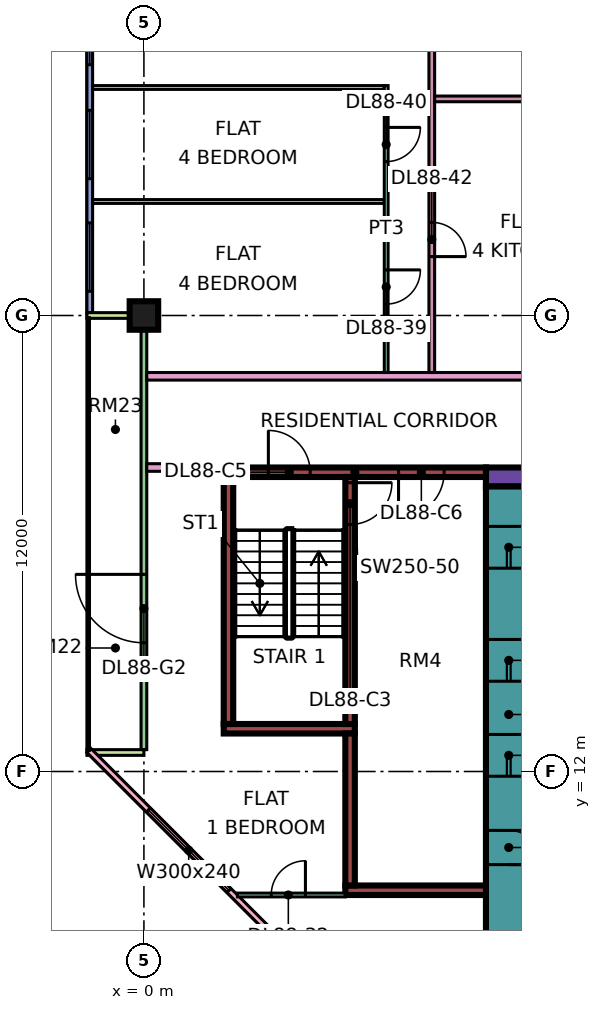
"""IFC4 building model, lengths in metres.
Left out: names, types, materials, properties, quantities, classifications, styles, units other than length and angle.
Written with IfcOpenShell. Run it as: python <this file> out.ifc"""

import sys

from ifc_helpers import new_model, si_unit, direction, frame, frame_2d, origin, origin_2d, place, context, subcontext, project, spatial, rectangle, extrude, element, fill, save


model = new_model("IFC4")
c1 = context("Model", 3, precision=1e-05, world=origin(), true_north=direction((0.0, 1.0)))
c2 = subcontext(c1, "Body", "Model", "MODEL_VIEW")
j1 = project(units=[si_unit("LENGTHUNIT", "METRE"), si_unit("PLANEANGLEUNIT", "RADIAN")], contexts=[c1])
p1 = place(None, origin())
s1 = spatial("IfcSite", under=j1, at=p1, CompositionType="ELEMENT")
p2 = place(p1, origin())
s2 = spatial("IfcBuilding", under=s1, at=p2, CompositionType="ELEMENT")
p3 = place(p2, frame((0.0, 0.0, 376.4)))
s3 = spatial("IfcBuildingStorey", under=s2, at=p3, CompositionType="ELEMENT", Elevation=376.4)
p4 = place(p3, frame((0.0, 24.0, 0.0), z_axis=(0.0, 0.0, 1.0), x_axis=(1.0, 0.0, 0.0)))
e1 = element("IfcColumn", 1, at=p4, inside=s3, PredefinedType="COLUMN", context=c2, shape_type="SweptSolid", body=[
    extrude(rectangle(XDim=0.75, YDim=0.75, at=origin_2d()), origin(), (0.0, 0.0, 1.0), 3.75),
])
p5 = place(p3, frame((9.0, 19.75, 0.0), z_axis=(0.0, 0.0, 1.0), x_axis=(1.0, 0.0, 0.0)))
e2 = element("IfcWall", 2, at=p5, inside=s3, PredefinedType="SHEAR", context=c2, shape_type="SweptSolid", body=[
    extrude(rectangle(XDim=25.0, YDim=0.5, at=frame_2d((12.5, 0.0))), origin(), (0.0, 0.0, 1.0), 3.75),
])
p6 = place(p5, frame((19.1, 0.0, 0.0)))
e3 = element("IfcOpeningElement", 3, at=p6, cuts=e2, PredefinedType="OPENING", context=c2, shape_type="SweptSolid", body=[
    extrude(rectangle(XDim=1.8, YDim=2.4, at=frame_2d((0.9, 1.2))), frame((0.0, 0.26, 0.0), z_axis=(0.0, -1.0, 0.0), x_axis=(1.0, 0.0, 0.0)), (0.0, 0.0, 1.0), 0.52),
])
p7 = place(p3, frame((9.6, 7.5, 0.0), z_axis=(0.0, 0.0, 1.0), x_axis=(0.0, 1.0, 0.0)))
e4 = element("IfcWall", 4, at=p7, inside=s3, PredefinedType="SHEAR", context=c2, shape_type="SweptSolid", body=[
    extrude(rectangle(XDim=12.0, YDim=1.2, at=frame_2d((6.0, 0.0))), origin(), (0.0, 0.0, 1.0), 3.75),
])
p8 = place(p7, frame((4.375, 0.0, 0.0)))
e5 = element("IfcOpeningElement", 5, at=p8, cuts=e4, PredefinedType="OPENING", context=c2, shape_type="SweptSolid", body=[
    extrude(rectangle(XDim=1.1, YDim=2.2, at=frame_2d((0.55, 1.1))), frame((0.0, 0.61, 0.0), z_axis=(0.0, -1.0, 0.0), x_axis=(1.0, 0.0, 0.0)), (0.0, 0.0, 1.0), 1.22),
])
p9 = place(p7, frame((6.875, 0.0, 0.0)))
e6 = element("IfcOpeningElement", 6, at=p9, cuts=e4, PredefinedType="OPENING", context=c2, shape_type="SweptSolid", body=[
    extrude(rectangle(XDim=1.1, YDim=2.2, at=frame_2d((0.55, 1.1))), frame((0.0, 0.61, 0.0), z_axis=(0.0, -1.0, 0.0), x_axis=(1.0, 0.0, 0.0)), (0.0, 0.0, 1.0), 1.22),
])
p10 = place(p7, frame((9.85, 0.0, 0.0)))
e7 = element("IfcOpeningElement", 7, at=p10, cuts=e4, PredefinedType="OPENING", context=c2, shape_type="SweptSolid", body=[
    extrude(rectangle(XDim=1.1, YDim=2.2, at=frame_2d((0.55, 1.1))), frame((0.0, 0.61, 0.0), z_axis=(0.0, -1.0, 0.0), x_axis=(1.0, 0.0, 0.0)), (0.0, 0.0, 1.0), 1.22),
])
p11 = place(p7, frame((2.05, 0.0, 0.0)))
e8 = element("IfcOpeningElement", 8, at=p11, cuts=e4, PredefinedType="OPENING", context=c2, shape_type="SweptSolid", body=[
    extrude(rectangle(XDim=0.9, YDim=2.1, at=frame_2d((0.45, 1.05))), frame((0.0, 0.61, 0.0), z_axis=(0.0, -1.0, 0.0), x_axis=(1.0, 0.0, 0.0)), (0.0, 0.0, 1.0), 1.22),
])
p12 = place(p3, frame((2.1, 19.875, 0.0), z_axis=(0.0, 0.0, 1.0), x_axis=(1.0, 0.0, 0.0)))
e9 = element("IfcWall", 9, at=p12, inside=s3, PredefinedType="SHEAR", context=c2, shape_type="SweptSolid", body=[
    extrude(rectangle(XDim=6.9, YDim=0.25, at=frame_2d((3.45, 0.0))), origin(), (0.0, 0.0, 1.0), 3.75),
])
p13 = place(p12, frame((1.175, 0.0, 0.0)))
e10 = element("IfcOpeningElement", 10, at=p13, cuts=e9, PredefinedType="OPENING", context=c2, shape_type="SweptSolid", body=[
    extrude(rectangle(XDim=1.1, YDim=2.2, at=frame_2d((0.55, 1.1))), frame((0.0, 0.135, 0.0), z_axis=(0.0, -1.0, 0.0), x_axis=(1.0, 0.0, 0.0)), (0.0, 0.0, 1.0), 0.27),
])
p14 = place(p12, frame((4.6, 0.0, 0.0)))
e11 = element("IfcOpeningElement", 11, at=p14, cuts=e9, PredefinedType="OPENING", context=c2, shape_type="SweptSolid", body=[
    extrude(rectangle(XDim=1.2, YDim=2.2, at=frame_2d((0.6, 1.1))), frame((0.0, 0.135, 0.0), z_axis=(0.0, -1.0, 0.0), x_axis=(1.0, 0.0, 0.0)), (0.0, 0.0, 1.0), 0.27),
])
p15 = place(p3, frame((2.1, 13.125, 0.0), z_axis=(0.0, 0.0, 1.0), x_axis=(1.0, 0.0, 0.0)))
e12 = element("IfcWall", 12, at=p15, inside=s3, PredefinedType="SHEAR", context=c2, shape_type="SweptSolid", body=[
    extrude(rectangle(XDim=3.45, YDim=0.25, at=frame_2d((1.725, 0.0))), origin(), (0.0, 0.0, 1.0), 3.75),
])
p16 = place(p3, frame((2.225, 13.25, 0.0), z_axis=(0.0, 0.0, 1.0), x_axis=(0.0, 1.0, 0.0)))
e13 = element("IfcWall", 13, at=p16, inside=s3, PredefinedType="SHEAR", context=c2, shape_type="SweptSolid", body=[
    extrude(rectangle(XDim=6.5, YDim=0.25, at=frame_2d((3.25, 0.0))), origin(), (0.0, 0.0, 1.0), 3.75),
])
p17 = place(p3, frame((5.425, 13.25, 0.0), z_axis=(0.0, 0.0, 1.0), x_axis=(0.0, 1.0, 0.0)))
e14 = element("IfcWall", 14, at=p17, inside=s3, PredefinedType="SHEAR", context=c2, shape_type="SweptSolid", body=[
    extrude(rectangle(XDim=6.5, YDim=0.25, at=frame_2d((3.25, 0.0))), origin(), (0.0, 0.0, 1.0), 3.75),
])
p18 = place(p17, frame((5.25, 0.0, 0.0)))
e15 = element("IfcOpeningElement", 15, at=p18, cuts=e14, PredefinedType="OPENING", context=c2, shape_type="SweptSolid", body=[
    extrude(rectangle(XDim=1.1, YDim=2.2, at=frame_2d((0.55, 1.1))), frame((0.0, 0.135, 0.0), z_axis=(0.0, -1.0, 0.0), x_axis=(1.0, 0.0, 0.0)), (0.0, 0.0, 1.0), 0.27),
])
p19 = place(p3, frame((5.3, 8.875, 0.0), z_axis=(0.0, 0.0, 1.0), x_axis=(1.0, 0.0, 0.0)))
e16 = element("IfcWall", 16, at=p19, inside=s3, PredefinedType="SHEAR", context=c2, shape_type="SweptSolid", body=[
    extrude(rectangle(XDim=3.7, YDim=0.25, at=frame_2d((1.85, 0.0))), origin(), (0.0, 0.0, 1.0), 3.75),
])
p20 = place(p3, frame((5.425, 9.0, 0.0), z_axis=(0.0, 0.0, 1.0), x_axis=(0.0, 1.0, 0.0)))
e17 = element("IfcWall", 17, at=p20, inside=s3, PredefinedType="SHEAR", context=c2, shape_type="SweptSolid", body=[
    extrude(rectangle(XDim=4.0, YDim=0.25, at=frame_2d((2.0, 0.0))), origin(), (0.0, 0.0, 1.0), 3.75),
])
p21 = place(p3, frame((-1.425, 35.925, 0.0), z_axis=(0.0, 0.0, 1.0), x_axis=(0.0, -1.0, 0.0)))
e18 = element("IfcWall", 18, at=p21, inside=s3, PredefinedType="SOLIDWALL", context=c2, shape_type="SweptSolid", body=[
    extrude(rectangle(XDim=11.85, YDim=0.15, at=frame_2d((5.925, 0.0))), origin(), (0.0, 0.0, 1.0), 3.35),
])
p22 = place(p21, frame((0.562, 0.0, 0.45)))
e19 = element("IfcOpeningElement", 19, at=p22, cuts=e18, PredefinedType="OPENING", context=c2, shape_type="SweptSolid", body=[
    extrude(rectangle(XDim=1.8, YDim=2.4, at=frame_2d((0.9, 1.2))), frame((0.0, 0.085, 0.0), z_axis=(0.0, -1.0, 0.0), x_axis=(1.0, 0.0, 0.0)), (0.0, 0.0, 1.0), 0.17),
])
p23 = place(p21, frame((3.525, 0.0, 0.45)))
e20 = element("IfcOpeningElement", 20, at=p23, cuts=e18, PredefinedType="OPENING", context=c2, shape_type="SweptSolid", body=[
    extrude(rectangle(XDim=1.8, YDim=2.4, at=frame_2d((0.9, 1.2))), frame((0.0, 0.085, 0.0), z_axis=(0.0, -1.0, 0.0), x_axis=(1.0, 0.0, 0.0)), (0.0, 0.0, 1.0), 0.17),
])
p24 = place(p21, frame((6.525, 0.0, 0.45)))
e21 = element("IfcOpeningElement", 21, at=p24, cuts=e18, PredefinedType="OPENING", context=c2, shape_type="SweptSolid", body=[
    extrude(rectangle(XDim=1.8, YDim=2.4, at=frame_2d((0.9, 1.2))), frame((0.0, 0.085, 0.0), z_axis=(0.0, -1.0, 0.0), x_axis=(1.0, 0.0, 0.0)), (0.0, 0.0, 1.0), 0.17),
])
p25 = place(p21, frame((9.488, 0.0, 0.45)))
e22 = element("IfcOpeningElement", 22, at=p25, cuts=e18, PredefinedType="OPENING", context=c2, shape_type="SweptSolid", body=[
    extrude(rectangle(XDim=1.8, YDim=2.4, at=frame_2d((0.9, 1.2))), frame((0.0, 0.085, 0.0), z_axis=(0.0, -1.0, 0.0), x_axis=(1.0, 0.0, 0.0)), (0.0, 0.0, 1.0), 0.17),
])
p26 = place(p3, frame((0.0, 23.925, 0.0), z_axis=(0.0, 0.0, 1.0), x_axis=(0.0, -1.0, 0.0)))
e23 = element("IfcWall", 23, at=p26, inside=s3, PredefinedType="SOLIDWALL", context=c2, shape_type="SweptSolid", body=[
    extrude(rectangle(XDim=11.35, YDim=0.15, at=frame_2d((5.675, 0.0))), origin(), (0.0, 0.0, 1.0), 3.35),
])
p27 = place(p26, frame((6.738, 0.0, 0.0)))
e24 = element("IfcOpeningElement", 24, at=p27, cuts=e23, PredefinedType="OPENING", context=c2, shape_type="SweptSolid", body=[
    extrude(rectangle(XDim=1.8, YDim=2.4, at=frame_2d((0.9, 1.2))), frame((0.0, 0.085, 0.0), z_axis=(0.0, -1.0, 0.0), x_axis=(1.0, 0.0, 0.0)), (0.0, 0.0, 1.0), 0.17),
])
for number, where, z_axis, x_axis in (
    (25, (-1.5, 24.0, 0.0), (0.0, 0.0, 1.0), (1.0, 0.0, 0.0)),
    (26, (-1.5, 12.5, 0.0), (0.0, 0.0, 1.0), (1.0, 0.0, 0.0)),
):
    element("IfcWall", number, at=place(p3, frame(where, z_axis=z_axis, x_axis=x_axis)), inside=s3, PredefinedType="SOLIDWALL", context=c2, shape_type="SweptSolid", body=[
        extrude(rectangle(XDim=1.5, YDim=0.15, at=frame_2d((0.75, 0.0))), origin(), (0.0, 0.0, 1.0), 3.35),
    ])
p28 = place(p3, frame((-1.447, 12.553, 0.0), z_axis=(0.0, 0.0, 1.0), x_axis=(0.707106781187, -0.707106781187, 0.0)))
e27 = element("IfcWall", 27, at=p28, inside=s3, PredefinedType="SOLIDWALL", context=c2, shape_type="SweptSolid", body=[
    extrude(rectangle(XDim=19.799, YDim=0.15, at=frame_2d((9.899, 0.0))), origin(), (0.0, 0.0, 1.0), 3.35),
])
p29 = place(p28, frame((2.212, 0.0, 0.45)))
e28 = element("IfcOpeningElement", 28, at=p29, cuts=e27, PredefinedType="OPENING", context=c2, shape_type="SweptSolid", body=[
    extrude(rectangle(XDim=3.0, YDim=2.4, at=frame_2d((1.5, 1.2))), frame((0.0, 0.085, 0.0), z_axis=(0.0, -1.0, 0.0), x_axis=(1.0, 0.0, 0.0)), (0.0, 0.0, 1.0), 0.17),
])
p30 = place(p28, frame((10.216, 0.0, 0.45)))
e29 = element("IfcOpeningElement", 29, at=p30, cuts=e27, PredefinedType="OPENING", context=c2, shape_type="SweptSolid", body=[
    extrude(rectangle(XDim=3.0, YDim=2.4, at=frame_2d((1.5, 1.2))), frame((0.0, 0.085, 0.0), z_axis=(0.0, -1.0, 0.0), x_axis=(1.0, 0.0, 0.0)), (0.0, 0.0, 1.0), 0.17),
])
p31 = place(p3, frame((-1.351, 27.0, 0.0), z_axis=(0.0, 0.0, 1.0), x_axis=(1.0, 0.0, 0.0)))
e30 = element("IfcWall", 30, at=p31, inside=s3, PredefinedType="PARTITIONING", context=c2, shape_type="SweptSolid", body=[
    extrude(rectangle(XDim=7.676, YDim=0.1, at=frame_2d((3.838, 0.0))), origin(), (0.0, 0.0, 1.0), 3.35),
])
p32 = place(p3, frame((-1.35, 30.0, 0.0), z_axis=(0.0, 0.0, 1.0), x_axis=(1.0, 0.0, 0.0)))
e31 = element("IfcWall", 31, at=p32, inside=s3, PredefinedType="PARTITIONING", context=c2, shape_type="SweptSolid", body=[
    extrude(rectangle(XDim=7.675, YDim=0.1, at=frame_2d((3.837, 0.0))), origin(), (0.0, 0.0, 1.0), 3.35),
])
p33 = place(p3, frame((0.074, 20.0, 0.0), z_axis=(0.0, 0.0, 1.0), x_axis=(1.0, 0.0, 0.0)))
e32 = element("IfcWall", 32, at=p33, inside=s3, PredefinedType="PARTITIONING", context=c2, shape_type="SweptSolid", body=[
    extrude(rectangle(XDim=2.026, YDim=0.2, at=frame_2d((1.013, 0.0))), origin(), (0.0, 0.0, 1.0), 3.35),
])
p34 = place(p3, frame((0.074, 22.4, 0.0), z_axis=(0.0, 0.0, 1.0), x_axis=(1.0, 0.0, 0.0)))
e33 = element("IfcWall", 33, at=p34, inside=s3, PredefinedType="PARTITIONING", context=c2, shape_type="SweptSolid", body=[
    extrude(rectangle(XDim=12.201, YDim=0.2, at=frame_2d((6.101, 0.0))), origin(), (0.0, 0.0, 1.0), 3.35),
])
p35 = place(p3, frame((2.461, 8.75, 0.0), z_axis=(0.0, 0.0, 1.0), x_axis=(1.0, 0.0, 0.0)))
e34 = element("IfcWall", 34, at=p35, inside=s3, PredefinedType="PARTITIONING", context=c2, shape_type="SweptSolid", body=[
    extrude(rectangle(XDim=2.839, YDim=0.1, at=frame_2d((1.419, 0.0))), origin(), (0.0, 0.0, 1.0), 3.35),
])
p36 = place(p35, frame((0.889, 0.0, 0.0)))
e35 = element("IfcOpeningElement", 35, at=p36, cuts=e34, PredefinedType="OPENING", context=c2, shape_type="SweptSolid", body=[
    extrude(rectangle(XDim=0.9, YDim=2.1, at=frame_2d((0.45, 1.05))), frame((0.0, 0.06, 0.0), z_axis=(0.0, -1.0, 0.0), x_axis=(1.0, 0.0, 0.0)), (0.0, 0.0, 1.0), 0.12),
])
p37 = place(p3, frame((6.375, 22.5, 0.0), z_axis=(0.0, 0.0, 1.0), x_axis=(0.0, 1.0, 0.0)))
e36 = element("IfcWall", 36, at=p37, inside=s3, PredefinedType="PARTITIONING", context=c2, shape_type="SweptSolid", body=[
    extrude(rectangle(XDim=7.55, YDim=0.1, at=frame_2d((3.775, 0.0))), origin(), (0.0, 0.0, 1.0), 3.35),
])
p38 = place(p37, frame((1.8, 0.0, 0.0)))
e37 = element("IfcOpeningElement", 37, at=p38, cuts=e36, PredefinedType="OPENING", context=c2, shape_type="SweptSolid", body=[
    extrude(rectangle(XDim=0.9, YDim=2.1, at=frame_2d((0.45, 1.05))), frame((0.0, 0.06, 0.0), z_axis=(0.0, -1.0, 0.0), x_axis=(1.0, 0.0, 0.0)), (0.0, 0.0, 1.0), 0.12),
])
p39 = place(p37, frame((5.55, 0.0, 0.0)))
e38 = element("IfcOpeningElement", 38, at=p39, cuts=e36, PredefinedType="OPENING", context=c2, shape_type="SweptSolid", body=[
    extrude(rectangle(XDim=0.9, YDim=2.1, at=frame_2d((0.45, 1.05))), frame((0.0, 0.06, 0.0), z_axis=(0.0, -1.0, 0.0), x_axis=(1.0, 0.0, 0.0)), (0.0, 0.0, 1.0), 0.12),
])
p40 = place(p3, frame((7.575, 22.5, 0.0), z_axis=(0.0, 0.0, 1.0), x_axis=(0.0, 1.0, 0.0)))
e39 = element("IfcWall", 39, at=p40, inside=s3, PredefinedType="PARTITIONING", context=c2, shape_type="SweptSolid", body=[
    extrude(rectangle(XDim=10.875, YDim=0.15, at=frame_2d((5.438, 0.0))), origin(), (0.0, 0.0, 1.0), 3.35),
])
p41 = place(p40, frame((8.55, 0.0, 0.0)))
e40 = element("IfcOpeningElement", 40, at=p41, cuts=e39, PredefinedType="OPENING", context=c2, shape_type="SweptSolid", body=[
    extrude(rectangle(XDim=0.8, YDim=2.1, at=frame_2d((0.4, 1.05))), frame((0.0, 0.085, 0.0), z_axis=(0.0, -1.0, 0.0), x_axis=(1.0, 0.0, 0.0)), (0.0, 0.0, 1.0), 0.17),
])
p42 = place(p40, frame((3.05, 0.0, 0.0)))
e41 = element("IfcOpeningElement", 41, at=p42, cuts=e39, PredefinedType="OPENING", context=c2, shape_type="SweptSolid", body=[
    extrude(rectangle(XDim=0.9, YDim=2.1, at=frame_2d((0.45, 1.05))), frame((0.0, 0.085, 0.0), z_axis=(0.0, -1.0, 0.0), x_axis=(1.0, 0.0, 0.0)), (0.0, 0.0, 1.0), 0.17),
])
p43 = place(p3, frame((7.65, 29.7, 0.0), z_axis=(0.0, 0.0, 1.0), x_axis=(1.0, 0.0, 0.0)))
e42 = element("IfcWall", 42, at=p43, inside=s3, PredefinedType="PARTITIONING", context=c2, shape_type="SweptSolid", body=[
    extrude(rectangle(XDim=4.625, YDim=0.15, at=frame_2d((2.312, 0.0))), origin(), (0.0, 0.0, 1.0), 3.35),
])
p44 = place(p23, origin())
e43 = element("IfcWindow", 43, at=p44, inside=s3, PartitioningType="SINGLE_PANEL", PredefinedType="WINDOW", context=c2, shape_type="SweptSolid", body=[
    extrude(rectangle(XDim=1.8, YDim=2.4, at=frame_2d((0.9, 1.2))), frame((0.0, 0.03, 0.0), z_axis=(0.0, -1.0, 0.0), x_axis=(1.0, 0.0, 0.0)), (0.0, 0.0, 1.0), 0.06),
])
fill(e20, e43)
p45 = place(p24, origin())
e44 = element("IfcWindow", 44, at=p45, inside=s3, PartitioningType="SINGLE_PANEL", PredefinedType="WINDOW", context=c2, shape_type="SweptSolid", body=[
    extrude(rectangle(XDim=1.8, YDim=2.4, at=frame_2d((0.9, 1.2))), frame((0.0, 0.03, 0.0), z_axis=(0.0, -1.0, 0.0), x_axis=(1.0, 0.0, 0.0)), (0.0, 0.0, 1.0), 0.06),
])
fill(e21, e44)
p46 = place(p25, origin())
e45 = element("IfcWindow", 45, at=p46, inside=s3, PartitioningType="SINGLE_PANEL", PredefinedType="WINDOW", context=c2, shape_type="SweptSolid", body=[
    extrude(rectangle(XDim=1.8, YDim=2.4, at=frame_2d((0.9, 1.2))), frame((0.0, 0.03, 0.0), z_axis=(0.0, -1.0, 0.0), x_axis=(1.0, 0.0, 0.0)), (0.0, 0.0, 1.0), 0.06),
])
fill(e22, e45)
p47 = place(p27, frame((1.8, 0.0, 0.0), z_axis=(0.0, 0.0, 1.0), x_axis=(-1.0, 0.0, 0.0)))
e46 = element("IfcDoor", 46, at=p47, inside=s3, OperationType="DOUBLE_DOOR_SINGLE_SWING", PredefinedType="DOOR", context=c2, shape_type="SweptSolid", body=[
    extrude(rectangle(XDim=1.8, YDim=2.4, at=frame_2d((0.9, 1.2))), frame((0.0, 0.025, 0.0), z_axis=(0.0, -1.0, 0.0), x_axis=(1.0, 0.0, 0.0)), (0.0, 0.0, 1.0), 0.05),
])
fill(e24, e46)
p48 = place(p29, origin())
e47 = element("IfcWindow", 47, at=p48, inside=s3, PartitioningType="SINGLE_PANEL", PredefinedType="WINDOW", context=c2, shape_type="SweptSolid", body=[
    extrude(rectangle(XDim=3.0, YDim=2.4, at=frame_2d((1.5, 1.2))), frame((0.0, 0.03, 0.0), z_axis=(0.0, -1.0, 0.0), x_axis=(1.0, 0.0, 0.0)), (0.0, 0.0, 1.0), 0.06),
])
fill(e28, e47)
p49 = place(p8, origin())
e48 = element("IfcDoor", 48, at=p49, inside=s3, OperationType="DOUBLE_DOOR_SLIDING", PredefinedType="DOOR", context=c2, shape_type="SweptSolid", body=[
    extrude(rectangle(XDim=1.1, YDim=2.2, at=frame_2d((0.55, 1.1))), frame((0.0, 0.025, 0.0), z_axis=(0.0, -1.0, 0.0), x_axis=(1.0, 0.0, 0.0)), (0.0, 0.0, 1.0), 0.05),
])
fill(e5, e48)
p50 = place(p9, origin())
e49 = element("IfcDoor", 49, at=p50, inside=s3, OperationType="DOUBLE_DOOR_SLIDING", PredefinedType="DOOR", context=c2, shape_type="SweptSolid", body=[
    extrude(rectangle(XDim=1.1, YDim=2.2, at=frame_2d((0.55, 1.1))), frame((0.0, 0.025, 0.0), z_axis=(0.0, -1.0, 0.0), x_axis=(1.0, 0.0, 0.0)), (0.0, 0.0, 1.0), 0.05),
])
fill(e6, e49)
p51 = place(p10, origin())
e50 = element("IfcDoor", 50, at=p51, inside=s3, OperationType="DOUBLE_DOOR_SLIDING", PredefinedType="DOOR", context=c2, shape_type="SweptSolid", body=[
    extrude(rectangle(XDim=1.1, YDim=2.2, at=frame_2d((0.55, 1.1))), frame((0.0, 0.025, 0.0), z_axis=(0.0, -1.0, 0.0), x_axis=(1.0, 0.0, 0.0)), (0.0, 0.0, 1.0), 0.05),
])
fill(e7, e50)
p52 = place(p18, origin())
e51 = element("IfcDoor", 51, at=p52, inside=s3, OperationType="SINGLE_SWING_RIGHT", PredefinedType="DOOR", context=c2, shape_type="SweptSolid", body=[
    extrude(rectangle(XDim=1.1, YDim=2.2, at=frame_2d((0.55, 1.1))), frame((0.0, 0.025, 0.0), z_axis=(0.0, -1.0, 0.0), x_axis=(1.0, 0.0, 0.0)), (0.0, 0.0, 1.0), 0.05),
])
fill(e15, e51)
p53 = place(p11, frame((0.9, 0.0, 0.0), z_axis=(0.0, 0.0, 1.0), x_axis=(-1.0, 0.0, 0.0)))
e52 = element("IfcDoor", 52, at=p53, inside=s3, OperationType="SINGLE_SWING_LEFT", PredefinedType="DOOR", context=c2, shape_type="SweptSolid", body=[
    extrude(rectangle(XDim=0.9, YDim=2.1, at=frame_2d((0.45, 1.05))), frame((0.0, 0.025, 0.0), z_axis=(0.0, -1.0, 0.0), x_axis=(1.0, 0.0, 0.0)), (0.0, 0.0, 1.0), 0.05),
])
fill(e8, e52)
p54 = place(p13, origin())
e53 = element("IfcDoor", 53, at=p54, inside=s3, OperationType="SINGLE_SWING_LEFT", PredefinedType="DOOR", context=c2, shape_type="SweptSolid", body=[
    extrude(rectangle(XDim=1.1, YDim=2.2, at=frame_2d((0.55, 1.1))), frame((0.0, 0.025, 0.0), z_axis=(0.0, -1.0, 0.0), x_axis=(1.0, 0.0, 0.0)), (0.0, 0.0, 1.0), 0.05),
])
fill(e10, e53)
p55 = place(p14, frame((1.2, 0.0, 0.0), z_axis=(0.0, 0.0, 1.0), x_axis=(-1.0, 0.0, 0.0)))
e54 = element("IfcDoor", 54, at=p55, inside=s3, OperationType="SINGLE_SWING_LEFT", PredefinedType="DOOR", context=c2, shape_type="SweptSolid", body=[
    extrude(rectangle(XDim=1.2, YDim=2.2, at=frame_2d((0.6, 1.1))), frame((0.0, 0.025, 0.0), z_axis=(0.0, -1.0, 0.0), x_axis=(1.0, 0.0, 0.0)), (0.0, 0.0, 1.0), 0.05),
])
fill(e11, e54)
p56 = place(p36, frame((0.9, 0.0, 0.0), z_axis=(0.0, 0.0, 1.0), x_axis=(-1.0, 0.0, 0.0)))
e55 = element("IfcDoor", 55, at=p56, inside=s3, OperationType="SINGLE_SWING_RIGHT", PredefinedType="DOOR", context=c2, shape_type="SweptSolid", body=[
    extrude(rectangle(XDim=0.9, YDim=2.1, at=frame_2d((0.45, 1.05))), frame((0.0, 0.025, 0.0), z_axis=(0.0, -1.0, 0.0), x_axis=(1.0, 0.0, 0.0)), (0.0, 0.0, 1.0), 0.05),
])
fill(e35, e55)
p57 = place(p38, origin())
e56 = element("IfcDoor", 56, at=p57, inside=s3, OperationType="SINGLE_SWING_RIGHT", PredefinedType="DOOR", context=c2, shape_type="SweptSolid", body=[
    extrude(rectangle(XDim=0.9, YDim=2.1, at=frame_2d((0.45, 1.05))), frame((0.0, 0.025, 0.0), z_axis=(0.0, -1.0, 0.0), x_axis=(1.0, 0.0, 0.0)), (0.0, 0.0, 1.0), 0.05),
])
fill(e37, e56)
p58 = place(p39, origin())
e57 = element("IfcDoor", 57, at=p58, inside=s3, OperationType="SINGLE_SWING_RIGHT", PredefinedType="DOOR", context=c2, shape_type="SweptSolid", body=[
    extrude(rectangle(XDim=0.9, YDim=2.1, at=frame_2d((0.45, 1.05))), frame((0.0, 0.025, 0.0), z_axis=(0.0, -1.0, 0.0), x_axis=(1.0, 0.0, 0.0)), (0.0, 0.0, 1.0), 0.05),
])
fill(e38, e57)
p59 = place(p42, frame((0.9, 0.0, 0.0), z_axis=(0.0, 0.0, 1.0), x_axis=(-1.0, 0.0, 0.0)))
e58 = element("IfcDoor", 58, at=p59, inside=s3, OperationType="SINGLE_SWING_LEFT", PredefinedType="DOOR", context=c2, shape_type="SweptSolid", body=[
    extrude(rectangle(XDim=0.9, YDim=2.1, at=frame_2d((0.45, 1.05))), frame((0.0, 0.025, 0.0), z_axis=(0.0, -1.0, 0.0), x_axis=(1.0, 0.0, 0.0)), (0.0, 0.0, 1.0), 0.05),
])
fill(e41, e58)
save(model, sys.argv[1])
